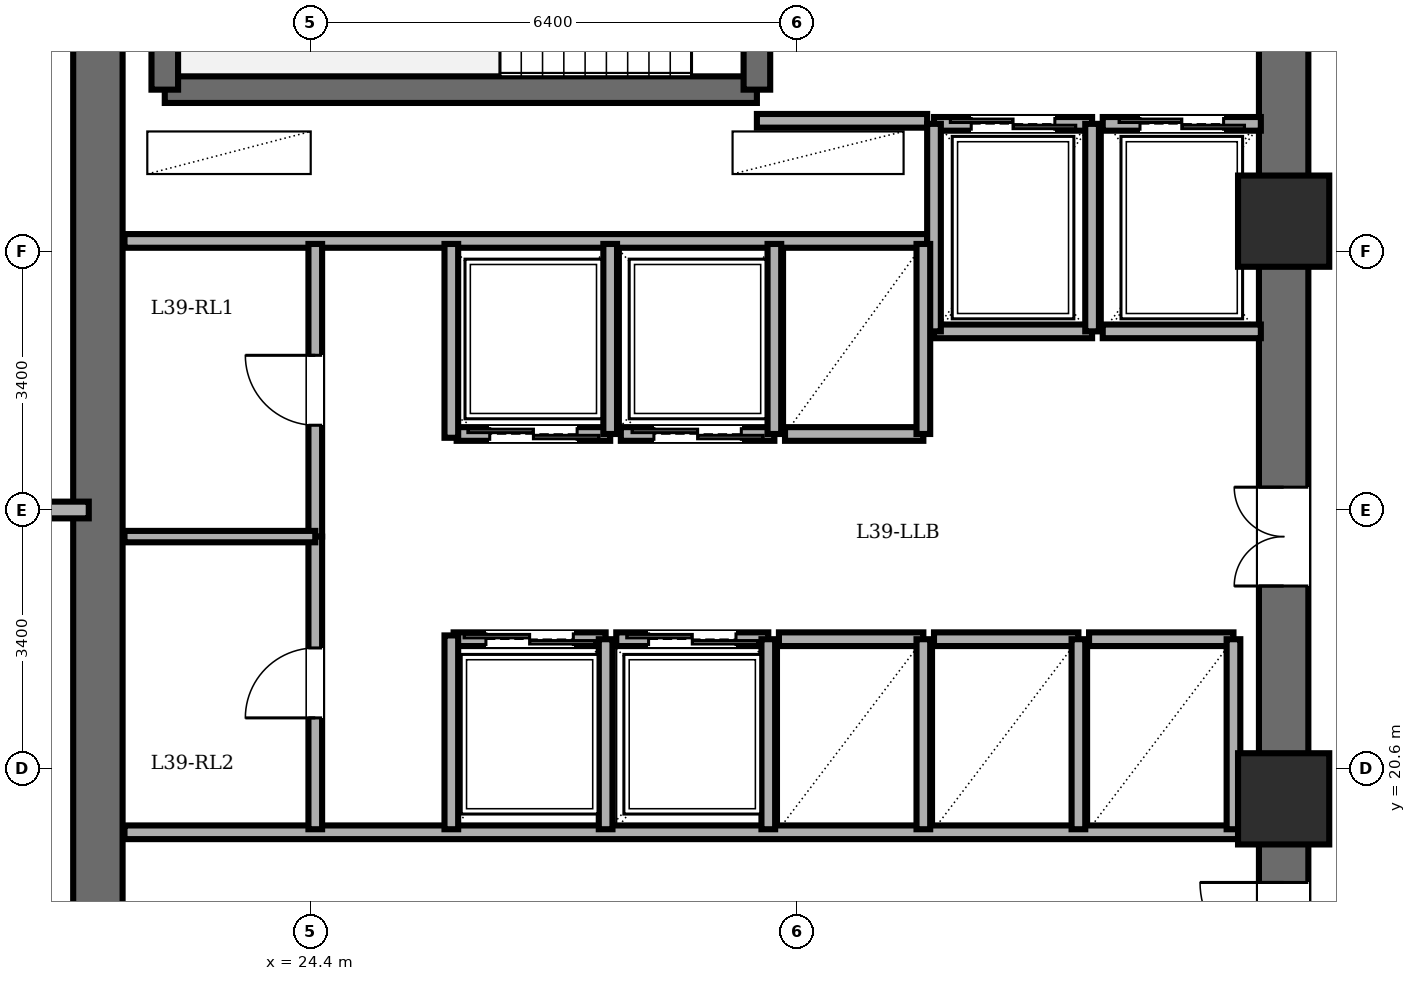
"""IFC4 building model, lengths in metres.
Left out: names, types, materials, properties, quantities, classifications, styles, units other than length and angle.
Written with IfcOpenShell. Run it as: python <this file> out.ifc"""

import sys

from ifc_helpers import new_model, si_unit, direction, frame, frame_2d, origin, origin_2d, place, context, subcontext, project, spatial, rectangle, extrude, element, fill, save


model = new_model("IFC4")
c1 = context("Model", 3, precision=1e-05, world=origin(), true_north=direction((0.0, 1.0)))
c2 = subcontext(c1, "Body", "Model", "MODEL_VIEW")
j1 = project(units=[si_unit("LENGTHUNIT", "METRE"), si_unit("PLANEANGLEUNIT", "RADIAN")], contexts=[c1])
p1 = place(None, origin())
s1 = spatial("IfcSite", under=j1, at=p1, CompositionType="ELEMENT")
p2 = place(p1, origin())
s2 = spatial("IfcBuilding", under=s1, at=p2, CompositionType="ELEMENT")
p3 = place(p2, frame((0.0, 0.0, 151.0)))
s3 = spatial("IfcBuildingStorey", under=s2, at=p3, CompositionType="ELEMENT", Elevation=151.0)
for number, where, z_axis, x_axis in (
    (1, (37.2, 20.2, 0.0), (0.0, 0.0, 1.0), (1.0, 0.0, 0.0)),
    (2, (37.2, 27.8, 0.0), (0.0, 0.0, 1.0), (1.0, 0.0, 0.0)),
):
    element("IfcColumn", number, at=place(p3, frame(where, z_axis=z_axis, x_axis=x_axis)), inside=s3, PredefinedType="COLUMN", context=c2, shape_type="SweptSolid", body=[
        extrude(rectangle(XDim=1.2, YDim=1.2, at=origin_2d()), origin(), (0.0, 0.0, 1.0), 3.6),
    ])
p4 = place(p3, frame((21.6, 14.4, 0.0), z_axis=(0.0, 0.0, 1.0), x_axis=(0.0, 1.0, 0.0)))
e3 = element("IfcWall", 3, at=p4, inside=s3, PredefinedType="SHEAR", context=c2, shape_type="SweptSolid", body=[
    extrude(rectangle(XDim=19.2, YDim=0.65, at=frame_2d((9.6, 0.0))), origin(), (0.0, 0.0, 1.0), 3.4),
])
p5 = place(p3, frame((37.2, 14.4, 0.0), z_axis=(0.0, 0.0, 1.0), x_axis=(0.0, 1.0, 0.0)))
e4 = element("IfcWall", 4, at=p5, inside=s3, PredefinedType="SHEAR", context=c2, shape_type="SweptSolid", body=[
    extrude(rectangle(XDim=19.2, YDim=0.65, at=frame_2d((9.6, 0.0))), origin(), (0.0, 0.0, 1.0), 3.4),
])
p6 = place(p5, frame((15.8, 0.0, 0.0)))
e5 = element("IfcOpeningElement", 5, at=p6, cuts=e4, PredefinedType="OPENING", context=c2, shape_type="SweptSolid", body=[
    extrude(rectangle(XDim=1.15, YDim=2.15, at=frame_2d((0.575, 1.075))), frame((0.0, 0.335, 0.0), z_axis=(0.0, -1.0, 0.0), x_axis=(1.0, 0.0, 0.0)), (0.0, 0.0, 1.0), 0.67),
])
p7 = place(p5, frame((3.6, 0.0, 0.0)))
e6 = element("IfcOpeningElement", 6, at=p7, cuts=e4, PredefinedType="OPENING", context=c2, shape_type="SweptSolid", body=[
    extrude(rectangle(XDim=1.1, YDim=2.15, at=frame_2d((0.55, 1.075))), frame((0.0, 0.335, 0.0), z_axis=(0.0, -1.0, 0.0), x_axis=(1.0, 0.0, 0.0)), (0.0, 0.0, 1.0), 0.67),
])
p8 = place(p5, frame((8.6, 0.0, 0.0)))
e7 = element("IfcOpeningElement", 7, at=p8, cuts=e4, PredefinedType="OPENING", context=c2, shape_type="SweptSolid", body=[
    extrude(rectangle(XDim=1.3, YDim=2.2, at=frame_2d((0.65, 1.1))), frame((0.0, 0.335, 0.0), z_axis=(0.0, -1.0, 0.0), x_axis=(1.0, 0.0, 0.0)), (0.0, 0.0, 1.0), 0.67),
])
p9 = place(p3, frame((22.48, 29.53, 0.0), z_axis=(0.0, 0.0, 1.0), x_axis=(1.0, 0.0, 0.0)))
e8 = element("IfcWall", 8, at=p9, inside=s3, PredefinedType="SOLIDWALL", context=c2, shape_type="SweptSolid", body=[
    extrude(rectangle(XDim=7.79, YDim=0.35, at=frame_2d((3.895, 0.0))), origin(), (0.0, 0.0, 1.0), 3.4),
])
p10 = place(p3, frame((22.48, 29.53, 0.0), z_axis=(0.0, 0.0, 1.0), x_axis=(0.0, 1.0, 0.0)))
e9 = element("IfcWall", 9, at=p10, inside=s3, PredefinedType="SOLIDWALL", context=c2, shape_type="SweptSolid", body=[
    extrude(rectangle(XDim=3.58, YDim=0.35, at=frame_2d((1.79, 0.0))), origin(), (0.0, 0.0, 1.0), 3.4),
])
p11 = place(p3, frame((30.27, 29.53, 0.0), z_axis=(0.0, 0.0, 1.0), x_axis=(0.0, 1.0, 0.0)))
e10 = element("IfcWall", 10, at=p11, inside=s3, PredefinedType="SOLIDWALL", context=c2, shape_type="SweptSolid", body=[
    extrude(rectangle(XDim=3.58, YDim=0.35, at=frame_2d((1.79, 0.0))), origin(), (0.0, 0.0, 1.0), 3.4),
])
p12 = place(p11, frame((1.25, 0.0, 0.0)))
e11 = element("IfcOpeningElement", 11, at=p12, cuts=e10, PredefinedType="OPENING", context=c2, shape_type="SweptSolid", body=[
    extrude(rectangle(XDim=1.1, YDim=2.15, at=frame_2d((0.55, 1.075))), frame((0.0, 0.185, 0.0), z_axis=(0.0, -1.0, 0.0), x_axis=(1.0, 0.0, 0.0)), (0.0, 0.0, 1.0), 0.37),
])
p13 = place(p3, frame((30.27, 29.12, 0.0), z_axis=(0.0, 0.0, 1.0), x_axis=(1.0, 0.0, 0.0)))
e12 = element("IfcWall", 12, at=p13, inside=s3, PredefinedType="PARTITIONING", context=c2, shape_type="SweptSolid", body=[
    extrude(rectangle(XDim=2.24, YDim=0.18, at=frame_2d((1.12, 0.0))), origin(), (0.0, 0.0, 1.0), 3.4),
])
p14 = place(p3, frame((21.95, 27.54, 0.0), z_axis=(0.0, 0.0, 1.0), x_axis=(1.0, 0.0, 0.0)))
e13 = element("IfcWall", 13, at=p14, inside=s3, PredefinedType="PARTITIONING", context=c2, shape_type="SweptSolid", body=[
    extrude(rectangle(XDim=10.56, YDim=0.18, at=frame_2d((5.28, 0.0))), origin(), (0.0, 0.0, 1.0), 3.4),
])
p15 = place(p3, frame((21.95, 19.76, 0.0), z_axis=(0.0, 0.0, 1.0), x_axis=(1.0, 0.0, 0.0)))
e14 = element("IfcWall", 14, at=p15, inside=s3, PredefinedType="PARTITIONING", context=c2, shape_type="SweptSolid", body=[
    extrude(rectangle(XDim=14.87, YDim=0.18, at=frame_2d((7.435, 0.0))), origin(), (0.0, 0.0, 1.0), 3.4),
])
p16 = place(p3, frame((32.6, 29.08, 0.0), z_axis=(0.0, 0.0, 1.0), x_axis=(1.0, 0.0, 0.0)))
e15 = element("IfcWall", 15, at=p16, inside=s3, PredefinedType="PARTITIONING", context=c2, shape_type="SweptSolid", body=[
    extrude(rectangle(XDim=2.08, YDim=0.18, at=frame_2d((1.04, 0.0))), origin(), (0.0, 0.0, 1.0), 3.4),
])
p17 = place(p16, frame((0.49, 0.0, 0.0)))
e16 = element("IfcOpeningElement", 16, at=p17, cuts=e15, PredefinedType="OPENING", context=c2, shape_type="SweptSolid", body=[
    extrude(rectangle(XDim=1.1, YDim=2.2, at=frame_2d((0.55, 1.1))), frame((0.0, 0.1, 0.0), z_axis=(0.0, -1.0, 0.0), x_axis=(1.0, 0.0, 0.0)), (0.0, 0.0, 1.0), 0.2),
])
p18 = place(p3, frame((34.68, 26.35, 0.0), z_axis=(0.0, 0.0, 1.0), x_axis=(-1.0, 0.0, 0.0)))
e17 = element("IfcWall", 17, at=p18, inside=s3, PredefinedType="PARTITIONING", context=c2, shape_type="SweptSolid", body=[
    extrude(rectangle(XDim=2.08, YDim=0.18, at=frame_2d((1.04, 0.0))), origin(), (0.0, 0.0, 1.0), 3.4),
])
for number, where, z_axis, x_axis in (
    (18, (34.68, 26.35, 0.0), (0.0, 0.0, 1.0), (0.0, 1.0, 0.0)),
    (19, (32.6, 29.08, 0.0), (0.0, 0.0, 1.0), (0.0, -1.0, 0.0)),
):
    element("IfcWall", number, at=place(p3, frame(where, z_axis=z_axis, x_axis=x_axis)), inside=s3, PredefinedType="PARTITIONING", context=c2, shape_type="SweptSolid", body=[
        extrude(rectangle(XDim=2.73, YDim=0.18, at=frame_2d((1.365, 0.0))), origin(), (0.0, 0.0, 1.0), 3.4),
    ])
p19 = place(p3, frame((34.82, 29.08, 0.0), z_axis=(0.0, 0.0, 1.0), x_axis=(1.0, 0.0, 0.0)))
e20 = element("IfcWall", 20, at=p19, inside=s3, PredefinedType="PARTITIONING", context=c2, shape_type="SweptSolid", body=[
    extrude(rectangle(XDim=2.08, YDim=0.18, at=frame_2d((1.04, 0.0))), origin(), (0.0, 0.0, 1.0), 3.4),
])
p20 = place(p19, frame((0.49, 0.0, 0.0)))
e21 = element("IfcOpeningElement", 21, at=p20, cuts=e20, PredefinedType="OPENING", context=c2, shape_type="SweptSolid", body=[
    extrude(rectangle(XDim=1.1, YDim=2.2, at=frame_2d((0.55, 1.1))), frame((0.0, 0.1, 0.0), z_axis=(0.0, -1.0, 0.0), x_axis=(1.0, 0.0, 0.0)), (0.0, 0.0, 1.0), 0.2),
])
p21 = place(p3, frame((36.9, 26.35, 0.0), z_axis=(0.0, 0.0, 1.0), x_axis=(-1.0, 0.0, 0.0)))
e22 = element("IfcWall", 22, at=p21, inside=s3, PredefinedType="PARTITIONING", context=c2, shape_type="SweptSolid", body=[
    extrude(rectangle(XDim=2.08, YDim=0.18, at=frame_2d((1.04, 0.0))), origin(), (0.0, 0.0, 1.0), 3.4),
])
p22 = place(p3, frame((28.34, 25.0, 0.0), z_axis=(0.0, 0.0, 1.0), x_axis=(-1.0, 0.0, 0.0)))
e23 = element("IfcWall", 23, at=p22, inside=s3, PredefinedType="PARTITIONING", context=c2, shape_type="SweptSolid", body=[
    extrude(rectangle(XDim=2.02, YDim=0.18, at=frame_2d((1.01, 0.0))), origin(), (0.0, 0.0, 1.0), 3.4),
])
p23 = place(p22, frame((0.435, 0.0, 0.0)))
e24 = element("IfcOpeningElement", 24, at=p23, cuts=e23, PredefinedType="OPENING", context=c2, shape_type="SweptSolid", body=[
    extrude(rectangle(XDim=1.15, YDim=2.2, at=frame_2d((0.575, 1.1))), frame((0.0, 0.1, 0.0), z_axis=(0.0, -1.0, 0.0), x_axis=(1.0, 0.0, 0.0)), (0.0, 0.0, 1.0), 0.2),
])
p24 = place(p3, frame((28.34, 25.0, 0.0), z_axis=(0.0, 0.0, 1.0), x_axis=(0.0, 1.0, 0.0)))
e25 = element("IfcWall", 25, at=p24, inside=s3, PredefinedType="PARTITIONING", context=c2, shape_type="SweptSolid", body=[
    extrude(rectangle(XDim=2.5, YDim=0.18, at=frame_2d((1.25, 0.0))), origin(), (0.0, 0.0, 1.0), 3.4),
])
p25 = place(p3, frame((30.5, 25.0, 0.0), z_axis=(0.0, 0.0, 1.0), x_axis=(-1.0, 0.0, 0.0)))
e26 = element("IfcWall", 26, at=p25, inside=s3, PredefinedType="PARTITIONING", context=c2, shape_type="SweptSolid", body=[
    extrude(rectangle(XDim=2.02, YDim=0.18, at=frame_2d((1.01, 0.0))), origin(), (0.0, 0.0, 1.0), 3.4),
])
p26 = place(p25, frame((0.435, 0.0, 0.0)))
e27 = element("IfcOpeningElement", 27, at=p26, cuts=e26, PredefinedType="OPENING", context=c2, shape_type="SweptSolid", body=[
    extrude(rectangle(XDim=1.15, YDim=2.2, at=frame_2d((0.575, 1.1))), frame((0.0, 0.1, 0.0), z_axis=(0.0, -1.0, 0.0), x_axis=(1.0, 0.0, 0.0)), (0.0, 0.0, 1.0), 0.2),
])
p27 = place(p3, frame((30.5, 25.0, 0.0), z_axis=(0.0, 0.0, 1.0), x_axis=(0.0, 1.0, 0.0)))
e28 = element("IfcWall", 28, at=p27, inside=s3, PredefinedType="PARTITIONING", context=c2, shape_type="SweptSolid", body=[
    extrude(rectangle(XDim=2.5, YDim=0.18, at=frame_2d((1.25, 0.0))), origin(), (0.0, 0.0, 1.0), 3.4),
])
p28 = place(p3, frame((26.28, 22.3, 0.0), z_axis=(0.0, 0.0, 1.0), x_axis=(1.0, 0.0, 0.0)))
e29 = element("IfcWall", 29, at=p28, inside=s3, PredefinedType="PARTITIONING", context=c2, shape_type="SweptSolid", body=[
    extrude(rectangle(XDim=2.0, YDim=0.18, at=frame_2d((1.0, 0.0))), origin(), (0.0, 0.0, 1.0), 3.4),
])
p29 = place(p28, frame((0.425, 0.0, 0.0)))
e30 = element("IfcOpeningElement", 30, at=p29, cuts=e29, PredefinedType="OPENING", context=c2, shape_type="SweptSolid", body=[
    extrude(rectangle(XDim=1.15, YDim=2.2, at=frame_2d((0.575, 1.1))), frame((0.0, 0.1, 0.0), z_axis=(0.0, -1.0, 0.0), x_axis=(1.0, 0.0, 0.0)), (0.0, 0.0, 1.0), 0.2),
])
p30 = place(p3, frame((28.28, 19.8, 0.0), z_axis=(0.0, 0.0, 1.0), x_axis=(0.0, 1.0, 0.0)))
e31 = element("IfcWall", 31, at=p30, inside=s3, PredefinedType="PARTITIONING", context=c2, shape_type="SweptSolid", body=[
    extrude(rectangle(XDim=2.5, YDim=0.18, at=frame_2d((1.25, 0.0))), origin(), (0.0, 0.0, 1.0), 3.4),
])
p31 = place(p3, frame((28.42, 22.3, 0.0), z_axis=(0.0, 0.0, 1.0), x_axis=(1.0, 0.0, 0.0)))
e32 = element("IfcWall", 32, at=p31, inside=s3, PredefinedType="PARTITIONING", context=c2, shape_type="SweptSolid", body=[
    extrude(rectangle(XDim=2.0, YDim=0.18, at=frame_2d((1.0, 0.0))), origin(), (0.0, 0.0, 1.0), 3.4),
])
p32 = place(p31, frame((0.425, 0.0, 0.0)))
e33 = element("IfcOpeningElement", 33, at=p32, cuts=e32, PredefinedType="OPENING", context=c2, shape_type="SweptSolid", body=[
    extrude(rectangle(XDim=1.15, YDim=2.2, at=frame_2d((0.575, 1.1))), frame((0.0, 0.1, 0.0), z_axis=(0.0, -1.0, 0.0), x_axis=(1.0, 0.0, 0.0)), (0.0, 0.0, 1.0), 0.2),
])
p33 = place(p3, frame((30.42, 19.8, 0.0), z_axis=(0.0, 0.0, 1.0), x_axis=(0.0, 1.0, 0.0)))
e34 = element("IfcWall", 34, at=p33, inside=s3, PredefinedType="PARTITIONING", context=c2, shape_type="SweptSolid", body=[
    extrude(rectangle(XDim=2.5, YDim=0.18, at=frame_2d((1.25, 0.0))), origin(), (0.0, 0.0, 1.0), 3.4),
])
p34 = place(p3, frame((32.46, 25.0, 0.0), z_axis=(0.0, 0.0, 1.0), x_axis=(-1.0, 0.0, 0.0)))
e35 = element("IfcWall", 35, at=p34, inside=s3, PredefinedType="PARTITIONING", context=c2, shape_type="SweptSolid", body=[
    extrude(rectangle(XDim=1.82, YDim=0.18, at=frame_2d((0.91, 0.0))), origin(), (0.0, 0.0, 1.0), 3.4),
])
p35 = place(p3, frame((32.46, 25.0, 0.0), z_axis=(0.0, 0.0, 1.0), x_axis=(0.0, 1.0, 0.0)))
e36 = element("IfcWall", 36, at=p35, inside=s3, PredefinedType="PARTITIONING", context=c2, shape_type="SweptSolid", body=[
    extrude(rectangle(XDim=2.5, YDim=0.18, at=frame_2d((1.25, 0.0))), origin(), (0.0, 0.0, 1.0), 3.4),
])
p36 = place(p3, frame((30.56, 22.3, 0.0), z_axis=(0.0, 0.0, 1.0), x_axis=(1.0, 0.0, 0.0)))
e37 = element("IfcWall", 37, at=p36, inside=s3, PredefinedType="PARTITIONING", context=c2, shape_type="SweptSolid", body=[
    extrude(rectangle(XDim=1.9, YDim=0.18, at=frame_2d((0.95, 0.0))), origin(), (0.0, 0.0, 1.0), 3.4),
])
p37 = place(p3, frame((32.46, 19.8, 0.0), z_axis=(0.0, 0.0, 1.0), x_axis=(0.0, 1.0, 0.0)))
e38 = element("IfcWall", 38, at=p37, inside=s3, PredefinedType="PARTITIONING", context=c2, shape_type="SweptSolid", body=[
    extrude(rectangle(XDim=2.5, YDim=0.18, at=frame_2d((1.25, 0.0))), origin(), (0.0, 0.0, 1.0), 3.4),
])
p38 = place(p3, frame((32.6, 22.3, 0.0), z_axis=(0.0, 0.0, 1.0), x_axis=(1.0, 0.0, 0.0)))
e39 = element("IfcWall", 39, at=p38, inside=s3, PredefinedType="PARTITIONING", context=c2, shape_type="SweptSolid", body=[
    extrude(rectangle(XDim=1.9, YDim=0.18, at=frame_2d((0.95, 0.0))), origin(), (0.0, 0.0, 1.0), 3.4),
])
p39 = place(p3, frame((34.5, 19.8, 0.0), z_axis=(0.0, 0.0, 1.0), x_axis=(0.0, 1.0, 0.0)))
e40 = element("IfcWall", 40, at=p39, inside=s3, PredefinedType="PARTITIONING", context=c2, shape_type="SweptSolid", body=[
    extrude(rectangle(XDim=2.5, YDim=0.18, at=frame_2d((1.25, 0.0))), origin(), (0.0, 0.0, 1.0), 3.4),
])
p40 = place(p3, frame((34.64, 22.3, 0.0), z_axis=(0.0, 0.0, 1.0), x_axis=(1.0, 0.0, 0.0)))
e41 = element("IfcWall", 41, at=p40, inside=s3, PredefinedType="PARTITIONING", context=c2, shape_type="SweptSolid", body=[
    extrude(rectangle(XDim=1.9, YDim=0.18, at=frame_2d((0.95, 0.0))), origin(), (0.0, 0.0, 1.0), 3.4),
])
p41 = place(p3, frame((36.54, 19.8, 0.0), z_axis=(0.0, 0.0, 1.0), x_axis=(0.0, 1.0, 0.0)))
e42 = element("IfcWall", 42, at=p41, inside=s3, PredefinedType="PARTITIONING", context=c2, shape_type="SweptSolid", body=[
    extrude(rectangle(XDim=2.5, YDim=0.18, at=frame_2d((1.25, 0.0))), origin(), (0.0, 0.0, 1.0), 3.4),
])
p42 = place(p3, frame((24.46, 23.65, 0.0), z_axis=(0.0, 0.0, 1.0), x_axis=(0.0, 1.0, 0.0)))
e43 = element("IfcWall", 43, at=p42, inside=s3, PredefinedType="PARTITIONING", context=c2, shape_type="SweptSolid", body=[
    extrude(rectangle(XDim=3.85, YDim=0.18, at=frame_2d((1.925, 0.0))), origin(), (0.0, 0.0, 1.0), 3.4),
])
p43 = place(p42, frame((1.465, 0.0, 0.0)))
e44 = element("IfcOpeningElement", 44, at=p43, cuts=e43, PredefinedType="OPENING", context=c2, shape_type="SweptSolid", body=[
    extrude(rectangle(XDim=0.92, YDim=2.1, at=frame_2d((0.46, 1.05))), frame((0.0, 0.1, 0.0), z_axis=(0.0, -1.0, 0.0), x_axis=(1.0, 0.0, 0.0)), (0.0, 0.0, 1.0), 0.2),
])
p44 = place(p3, frame((24.46, 19.8, 0.0), z_axis=(0.0, 0.0, 1.0), x_axis=(0.0, 1.0, 0.0)))
e45 = element("IfcWall", 45, at=p44, inside=s3, PredefinedType="PARTITIONING", context=c2, shape_type="SweptSolid", body=[
    extrude(rectangle(XDim=3.85, YDim=0.18, at=frame_2d((1.925, 0.0))), origin(), (0.0, 0.0, 1.0), 3.4),
])
p45 = place(p44, frame((1.465, 0.0, 0.0)))
e46 = element("IfcOpeningElement", 46, at=p45, cuts=e45, PredefinedType="OPENING", context=c2, shape_type="SweptSolid", body=[
    extrude(rectangle(XDim=0.92, YDim=2.1, at=frame_2d((0.46, 1.05))), frame((0.0, 0.1, 0.0), z_axis=(0.0, -1.0, 0.0), x_axis=(1.0, 0.0, 0.0)), (0.0, 0.0, 1.0), 0.2),
])
p46 = place(p3, frame((21.95, 23.65, 0.0), z_axis=(0.0, 0.0, 1.0), x_axis=(1.0, 0.0, 0.0)))
e47 = element("IfcWall", 47, at=p46, inside=s3, PredefinedType="PARTITIONING", context=c2, shape_type="SweptSolid", body=[
    extrude(rectangle(XDim=2.51, YDim=0.15, at=frame_2d((1.255, 0.0))), origin(), (0.0, 0.0, 1.0), 3.4),
])
for number, where, z_axis, x_axis in (
    (48, (26.25, 24.95, 0.0), (0.0, 0.0, 1.0), (0.0, 1.0, 0.0)),
    (49, (26.25, 19.8, 0.0), (0.0, 0.0, 1.0), (0.0, 1.0, 0.0)),
):
    element("IfcWall", number, at=place(p3, frame(where, z_axis=z_axis, x_axis=x_axis)), inside=s3, PredefinedType="PARTITIONING", context=c2, shape_type="SweptSolid", body=[
        extrude(rectangle(XDim=2.55, YDim=0.18, at=frame_2d((1.275, 0.0))), origin(), (0.0, 0.0, 1.0), 3.4),
    ])
p47 = place(p3, frame((13.8, 24.0, 0.0), z_axis=(0.0, 0.0, 1.0), x_axis=(1.0, 0.0, 0.0)))
e50 = element("IfcWall", 50, at=p47, inside=s3, PredefinedType="PARTITIONING", context=c2, shape_type="SweptSolid", body=[
    extrude(rectangle(XDim=7.68, YDim=0.22, at=frame_2d((3.84, 0.0))), origin(), (0.0, 0.0, 1.0), 3.4),
])
p48 = place(p7, origin())
e51 = element("IfcDoor", 51, at=p48, inside=s3, OperationType="SINGLE_SWING_RIGHT", PredefinedType="DOOR", context=c2, shape_type="SweptSolid", body=[
    extrude(rectangle(XDim=1.1, YDim=2.15, at=frame_2d((0.55, 1.075))), frame((0.0, 0.025, 0.0), z_axis=(0.0, -1.0, 0.0), x_axis=(1.0, 0.0, 0.0)), (0.0, 0.0, 1.0), 0.05),
])
fill(e6, e51)
p49 = place(p17, origin())
e52 = element("IfcDoor", 52, at=p49, inside=s3, OperationType="DOUBLE_DOOR_SLIDING", PredefinedType="DOOR", context=c2, shape_type="SweptSolid", body=[
    extrude(rectangle(XDim=1.1, YDim=2.2, at=frame_2d((0.55, 1.1))), frame((0.0, 0.025, 0.0), z_axis=(0.0, -1.0, 0.0), x_axis=(1.0, 0.0, 0.0)), (0.0, 0.0, 1.0), 0.05),
])
fill(e16, e52)
p50 = place(p20, origin())
e53 = element("IfcDoor", 53, at=p50, inside=s3, OperationType="DOUBLE_DOOR_SLIDING", PredefinedType="DOOR", context=c2, shape_type="SweptSolid", body=[
    extrude(rectangle(XDim=1.1, YDim=2.2, at=frame_2d((0.55, 1.1))), frame((0.0, 0.025, 0.0), z_axis=(0.0, -1.0, 0.0), x_axis=(1.0, 0.0, 0.0)), (0.0, 0.0, 1.0), 0.05),
])
fill(e21, e53)
p51 = place(p23, origin())
e54 = element("IfcDoor", 54, at=p51, inside=s3, OperationType="DOUBLE_DOOR_SLIDING", PredefinedType="DOOR", context=c2, shape_type="SweptSolid", body=[
    extrude(rectangle(XDim=1.15, YDim=2.2, at=frame_2d((0.575, 1.1))), frame((0.0, 0.025, 0.0), z_axis=(0.0, -1.0, 0.0), x_axis=(1.0, 0.0, 0.0)), (0.0, 0.0, 1.0), 0.05),
])
fill(e24, e54)
p52 = place(p26, origin())
e55 = element("IfcDoor", 55, at=p52, inside=s3, OperationType="DOUBLE_DOOR_SLIDING", PredefinedType="DOOR", context=c2, shape_type="SweptSolid", body=[
    extrude(rectangle(XDim=1.15, YDim=2.2, at=frame_2d((0.575, 1.1))), frame((0.0, 0.025, 0.0), z_axis=(0.0, -1.0, 0.0), x_axis=(1.0, 0.0, 0.0)), (0.0, 0.0, 1.0), 0.05),
])
fill(e27, e55)
p53 = place(p29, origin())
e56 = element("IfcDoor", 56, at=p53, inside=s3, OperationType="DOUBLE_DOOR_SLIDING", PredefinedType="DOOR", context=c2, shape_type="SweptSolid", body=[
    extrude(rectangle(XDim=1.15, YDim=2.2, at=frame_2d((0.575, 1.1))), frame((0.0, 0.025, 0.0), z_axis=(0.0, -1.0, 0.0), x_axis=(1.0, 0.0, 0.0)), (0.0, 0.0, 1.0), 0.05),
])
fill(e30, e56)
p54 = place(p32, origin())
e57 = element("IfcDoor", 57, at=p54, inside=s3, OperationType="DOUBLE_DOOR_SLIDING", PredefinedType="DOOR", context=c2, shape_type="SweptSolid", body=[
    extrude(rectangle(XDim=1.15, YDim=2.2, at=frame_2d((0.575, 1.1))), frame((0.0, 0.025, 0.0), z_axis=(0.0, -1.0, 0.0), x_axis=(1.0, 0.0, 0.0)), (0.0, 0.0, 1.0), 0.05),
])
fill(e33, e57)
p55 = place(p43, origin())
e58 = element("IfcDoor", 58, at=p55, inside=s3, OperationType="SINGLE_SWING_RIGHT", PredefinedType="DOOR", context=c2, shape_type="SweptSolid", body=[
    extrude(rectangle(XDim=0.92, YDim=2.1, at=frame_2d((0.46, 1.05))), frame((0.0, 0.025, 0.0), z_axis=(0.0, -1.0, 0.0), x_axis=(1.0, 0.0, 0.0)), (0.0, 0.0, 1.0), 0.05),
])
fill(e44, e58)
p56 = place(p45, origin())
e59 = element("IfcDoor", 59, at=p56, inside=s3, OperationType="SINGLE_SWING_LEFT", PredefinedType="DOOR", context=c2, shape_type="SweptSolid", body=[
    extrude(rectangle(XDim=0.92, YDim=2.1, at=frame_2d((0.46, 1.05))), frame((0.0, 0.025, 0.0), z_axis=(0.0, -1.0, 0.0), x_axis=(1.0, 0.0, 0.0)), (0.0, 0.0, 1.0), 0.05),
])
fill(e46, e59)
p57 = place(p8, origin())
e60 = element("IfcDoor", 60, at=p57, inside=s3, OperationType="DOUBLE_DOOR_SINGLE_SWING", PredefinedType="DOOR", context=c2, shape_type="SweptSolid", body=[
    extrude(rectangle(XDim=1.3, YDim=2.2, at=frame_2d((0.65, 1.1))), frame((0.0, 0.025, 0.0), z_axis=(0.0, -1.0, 0.0), x_axis=(1.0, 0.0, 0.0)), (0.0, 0.0, 1.0), 0.05),
])
fill(e7, e60)
save(model, sys.argv[1])
